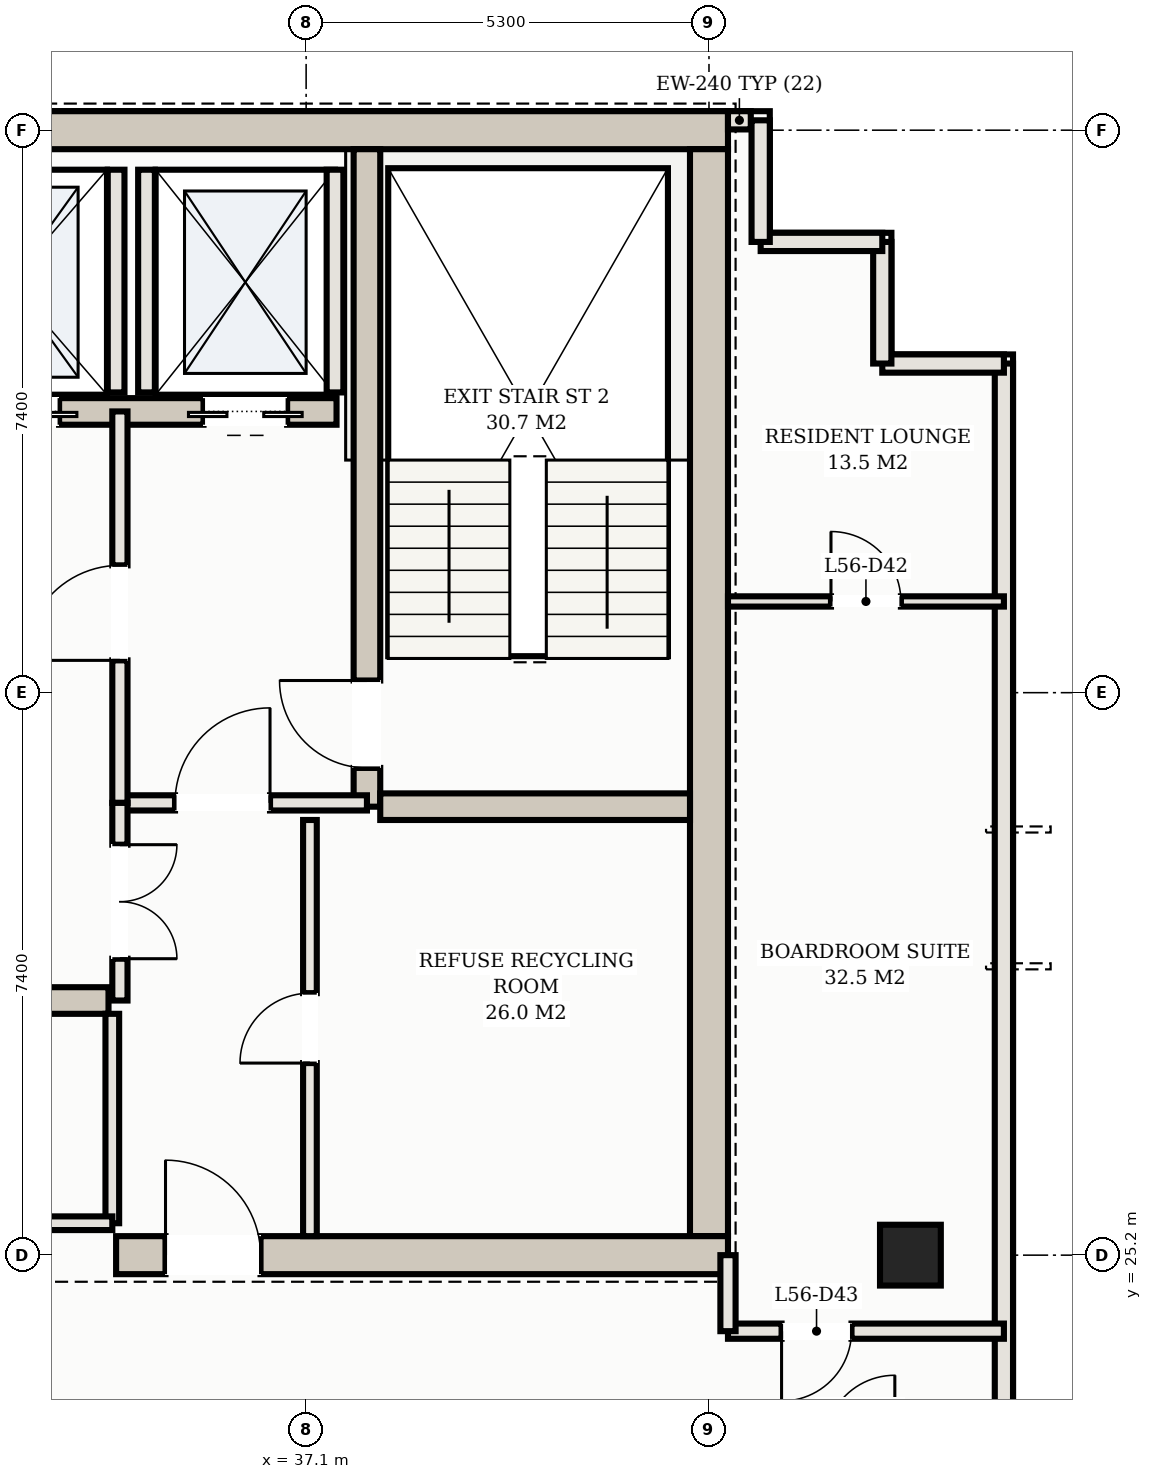
"""IFC4 building model, lengths in metres.
Left out: names, types, materials, properties, quantities, classifications, styles, units other than length and angle.
Written with IfcOpenShell. Run it as: python <this file> out.ifc"""

import sys

from ifc_helpers import new_model, si_unit, direction, frame, frame_2d, origin, origin_2d, place, context, subcontext, project, spatial, rectangle, hollow_rectangle, extrude, element, fill, save


model = new_model("IFC4")
c1 = context("Model", 3, precision=1e-05, world=origin(), true_north=direction((0.0, 1.0)))
c2 = subcontext(c1, "Body", "Model", "MODEL_VIEW")
j1 = project(units=[si_unit("LENGTHUNIT", "METRE"), si_unit("PLANEANGLEUNIT", "RADIAN")], contexts=[c1])
p1 = place(None, origin())
s1 = spatial("IfcSite", under=j1, at=p1, CompositionType="ELEMENT")
p2 = place(p1, origin())
s2 = spatial("IfcBuilding", under=s1, at=p2, CompositionType="ELEMENT")
p3 = place(p2, frame((0.0, 0.0, 206.6)))
s3 = spatial("IfcBuildingStorey", under=s2, at=p3, CompositionType="ELEMENT", Elevation=206.6)
p4 = place(p3, frame((10.35, 40.0, 0.0), z_axis=(0.0, 0.0, 1.0), x_axis=(1.0, 0.0, 0.0)))
e1 = element("IfcWall", 1, at=p4, inside=s3, PredefinedType="SHEAR", context=c2, shape_type="SweptSolid", body=[
    extrude(rectangle(XDim=32.3, YDim=0.5, at=frame_2d((16.15, 0.0))), origin(), (0.0, 0.0, 1.0), 3.11),
])
p5 = place(p3, frame((42.4, 25.45, 0.0), z_axis=(0.0, 0.0, 1.0), x_axis=(0.0, 1.0, 0.0)))
e2 = element("IfcWall", 2, at=p5, inside=s3, PredefinedType="SHEAR", context=c2, shape_type="SweptSolid", body=[
    extrude(rectangle(XDim=14.3, YDim=0.5, at=frame_2d((7.15, 0.0))), origin(), (0.0, 0.0, 1.0), 3.11),
])
p6 = place(p3, frame((34.6, 25.2, 0.0), z_axis=(0.0, 0.0, 1.0), x_axis=(1.0, 0.0, 0.0)))
e3 = element("IfcWall", 3, at=p6, inside=s3, PredefinedType="SHEAR", context=c2, shape_type="SweptSolid", body=[
    extrude(rectangle(XDim=8.05, YDim=0.5, at=frame_2d((4.025, 0.0))), origin(), (0.0, 0.0, 1.0), 3.11),
])
p7 = place(p6, frame((0.65, 0.0, 0.0)))
e4 = element("IfcOpeningElement", 4, at=p7, cuts=e3, PredefinedType="OPENING", context=c2, shape_type="SweptSolid", body=[
    extrude(rectangle(XDim=1.25, YDim=2.2, at=frame_2d((0.625, 1.1))), frame((0.0, 0.26, 0.0), z_axis=(0.0, -1.0, 0.0), x_axis=(1.0, 0.0, 0.0)), (0.0, 0.0, 1.0), 0.52),
])
p8 = place(p3, frame((37.9, 31.1, 0.0), z_axis=(0.0, 0.0, 1.0), x_axis=(0.0, 1.0, 0.0)))
e5 = element("IfcWall", 5, at=p8, inside=s3, PredefinedType="SHEAR", context=c2, shape_type="SweptSolid", body=[
    extrude(rectangle(XDim=8.65, YDim=0.35, at=frame_2d((4.325, 0.0))), origin(), (0.0, 0.0, 1.0), 3.11),
])
p9 = place(p8, frame((0.51, 0.0, 0.0)))
e6 = element("IfcOpeningElement", 6, at=p9, cuts=e5, PredefinedType="OPENING", context=c2, shape_type="SweptSolid", body=[
    extrude(rectangle(XDim=1.15, YDim=2.2, at=frame_2d((0.575, 1.1))), frame((0.0, 0.185, 0.0), z_axis=(0.0, -1.0, 0.0), x_axis=(1.0, 0.0, 0.0)), (0.0, 0.0, 1.0), 0.37),
])
p10 = place(p3, frame((38.075, 31.1, 0.0), z_axis=(0.0, 0.0, 1.0), x_axis=(1.0, 0.0, 0.0)))
e7 = element("IfcWall", 7, at=p10, inside=s3, PredefinedType="SHEAR", context=c2, shape_type="SweptSolid", body=[
    extrude(rectangle(XDim=4.075, YDim=0.35, at=frame_2d((2.038, 0.0))), origin(), (0.0, 0.0, 1.0), 3.11),
])
p11 = place(p3, frame((15.5, 36.3, 0.0), z_axis=(0.0, 0.0, 1.0), x_axis=(1.0, 0.0, 0.0)))
e8 = element("IfcWall", 8, at=p11, inside=s3, PredefinedType="SHEAR", context=c2, shape_type="SweptSolid", body=[
    extrude(rectangle(XDim=22.0, YDim=0.35, at=frame_2d((11.0, 0.0))), origin(), (0.0, 0.0, 1.0), 3.11),
])
p12 = place(p11, frame((0.65, 0.0, 0.0)))
e9 = element("IfcOpeningElement", 9, at=p12, cuts=e8, PredefinedType="OPENING", context=c2, shape_type="SweptSolid", body=[
    extrude(rectangle(XDim=1.1, YDim=2.15, at=frame_2d((0.55, 1.075))), frame((0.0, 0.185, 0.0), z_axis=(0.0, -1.0, 0.0), x_axis=(1.0, 0.0, 0.0)), (0.0, 0.0, 1.0), 0.37),
])
p13 = place(p11, frame((20.25, 0.0, 0.0)))
e10 = element("IfcOpeningElement", 10, at=p13, cuts=e8, PredefinedType="OPENING", context=c2, shape_type="SweptSolid", body=[
    extrude(rectangle(XDim=1.1, YDim=2.15, at=frame_2d((0.55, 1.075))), frame((0.0, 0.185, 0.0), z_axis=(0.0, -1.0, 0.0), x_axis=(1.0, 0.0, 0.0)), (0.0, 0.0, 1.0), 0.37),
])
p14 = place(p11, frame((17.05, 0.0, 0.0)))
e11 = element("IfcOpeningElement", 11, at=p14, cuts=e8, PredefinedType="OPENING", context=c2, shape_type="SweptSolid", body=[
    extrude(rectangle(XDim=1.3, YDim=2.2, at=frame_2d((0.65, 1.1))), frame((0.0, 0.185, 0.0), z_axis=(0.0, -1.0, 0.0), x_axis=(1.0, 0.0, 0.0)), (0.0, 0.0, 1.0), 0.37),
])
p15 = place(p11, frame((3.95, 0.0, 0.0)))
e12 = element("IfcOpeningElement", 12, at=p15, cuts=e8, PredefinedType="OPENING", context=c2, shape_type="SweptSolid", body=[
    extrude(rectangle(XDim=1.1, YDim=2.15, at=frame_2d((0.55, 1.075))), frame((0.0, 0.185, 0.0), z_axis=(0.0, -1.0, 0.0), x_axis=(1.0, 0.0, 0.0)), (0.0, 0.0, 1.0), 0.37),
])
p16 = place(p11, frame((6.55, 0.0, 0.0)))
e13 = element("IfcOpeningElement", 13, at=p16, cuts=e8, PredefinedType="OPENING", context=c2, shape_type="SweptSolid", body=[
    extrude(rectangle(XDim=1.1, YDim=2.15, at=frame_2d((0.55, 1.075))), frame((0.0, 0.185, 0.0), z_axis=(0.0, -1.0, 0.0), x_axis=(1.0, 0.0, 0.0)), (0.0, 0.0, 1.0), 0.37),
])
p17 = place(p11, frame((9.15, 0.0, 0.0)))
e14 = element("IfcOpeningElement", 14, at=p17, cuts=e8, PredefinedType="OPENING", context=c2, shape_type="SweptSolid", body=[
    extrude(rectangle(XDim=1.1, YDim=2.15, at=frame_2d((0.55, 1.075))), frame((0.0, 0.185, 0.0), z_axis=(0.0, -1.0, 0.0), x_axis=(1.0, 0.0, 0.0)), (0.0, 0.0, 1.0), 0.37),
])
p18 = place(p3, frame((18.5, 28.55, 0.0), z_axis=(0.0, 0.0, 1.0), x_axis=(1.0, 0.0, 0.0)))
e15 = element("IfcWall", 15, at=p18, inside=s3, PredefinedType="SHEAR", context=c2, shape_type="SweptSolid", body=[
    extrude(rectangle(XDim=16.0, YDim=0.35, at=frame_2d((8.0, 0.0))), origin(), (0.0, 0.0, 1.0), 3.11),
])
p19 = place(p3, frame((45.05, 25.2, 0.0), z_axis=(0.0, 0.0, 1.0), x_axis=(1.0, 0.0, 0.0)))
e16 = element("IfcColumn", 16, at=p19, inside=s3, PredefinedType="COLUMN", context=c2, shape_type="SweptSolid", body=[
    extrude(hollow_rectangle(XDim=0.8, YDim=0.8, WallThickness=0.028, at=origin_2d()), origin(), (0.0, 0.0, 1.0), 3.3),
])
for number, where, z_axis, x_axis in (
    (17, (35.0, 36.55, 0.0), (0.0, 0.0, 1.0), (0.0, 1.0, 0.0)),
    (18, (37.48, 36.55, 0.0), (0.0, 0.0, 1.0), (0.0, 1.0, 0.0)),
    (19, (34.6, 36.55, 0.0), (0.0, 0.0, 1.0), (0.0, 1.0, 0.0)),
):
    element("IfcWall", number, at=place(p3, frame(where, z_axis=z_axis, x_axis=x_axis)), inside=s3, PredefinedType="SOLIDWALL", context=c2, shape_type="SweptSolid", body=[
        extrude(rectangle(XDim=2.93, YDim=0.22, at=frame_2d((1.465, 0.0))), origin(), (0.0, 0.0, 1.0), 3.11),
    ])
p20 = place(p3, frame((46.28, 10.52, 0.0), z_axis=(0.0, 0.0, 1.0), x_axis=(0.0, 1.0, 0.0)))
e20 = element("IfcWall", 20, at=p20, inside=s3, PredefinedType="SOLIDWALL", context=c2, shape_type="SweptSolid", body=[
    extrude(rectangle(XDim=26.41, YDim=0.24, at=frame_2d((13.205, 0.0))), origin(), (0.0, 0.0, 1.0), 3.11),
])
p21 = place(p20, frame((6.48, 0.0, 0.0)))
e21 = element("IfcOpeningElement", 21, at=p21, cuts=e20, PredefinedType="OPENING", context=c2, shape_type="SweptSolid", body=[
    extrude(rectangle(XDim=1.8, YDim=2.2, at=frame_2d((0.9, 1.1))), frame((0.0, 0.13, 0.0), z_axis=(0.0, -1.0, 0.0), x_axis=(1.0, 0.0, 0.0)), (0.0, 0.0, 1.0), 0.26),
])
for number, where, z_axis, x_axis in (
    (22, (46.28, 36.93, 0.0), (0.0, 0.0, 1.0), (-1.0, 0.0, 0.0)),
    (23, (44.68, 36.93, 0.0), (0.0, 0.0, 1.0), (0.0, 1.0, 0.0)),
):
    element("IfcWall", number, at=place(p3, frame(where, z_axis=z_axis, x_axis=x_axis)), inside=s3, PredefinedType="SOLIDWALL", context=c2, shape_type="SweptSolid", body=[
        extrude(rectangle(XDim=1.6, YDim=0.24, at=frame_2d((0.8, 0.0))), origin(), (0.0, 0.0, 1.0), 3.11),
    ])
for number, where, z_axis, x_axis in (
    (24, (44.68, 38.53, 0.0), (0.0, 0.0, 1.0), (-1.0, 0.0, 0.0)),
    (25, (43.08, 38.53, 0.0), (0.0, 0.0, 1.0), (0.0, 1.0, 0.0)),
):
    element("IfcWall", number, at=place(p3, frame(where, z_axis=z_axis, x_axis=x_axis)), inside=s3, PredefinedType="SOLIDWALL", context=c2, shape_type="SweptSolid", body=[
        extrude(rectangle(XDim=1.6, YDim=0.24, at=frame_2d((0.8, 0.0))), origin(), (0.0, 0.0, 1.0), 3.11),
    ])
p22 = place(p3, frame((42.95, 40.13, 0.0), z_axis=(0.0, 0.0, 1.0), x_axis=(-1.0, 0.0, 0.0)))
e26 = element("IfcWall", 26, at=p22, inside=s3, PredefinedType="SOLIDWALL", context=c2, shape_type="SweptSolid", body=[
    extrude(rectangle(XDim=0.3, YDim=0.24, at=frame_2d((0.15, 0.0))), origin(), (0.0, 0.0, 1.0), 3.11),
])
p23 = place(p3, frame((34.65, 31.15, 0.0), z_axis=(0.0, 0.0, 1.0), x_axis=(1.0, 0.0, 0.0)))
e27 = element("IfcWall", 27, at=p23, inside=s3, PredefinedType="PARTITIONING", context=c2, shape_type="SweptSolid", body=[
    extrude(rectangle(XDim=3.25, YDim=0.2, at=frame_2d((1.625, 0.0))), origin(), (0.0, 0.0, 1.0), 2.43),
])
p24 = place(p23, frame((0.725, 0.0, 0.0)))
e28 = element("IfcOpeningElement", 28, at=p24, cuts=e27, PredefinedType="OPENING", context=c2, shape_type="SweptSolid", body=[
    extrude(rectangle(XDim=1.25, YDim=2.2, at=frame_2d((0.625, 1.1))), frame((0.0, 0.11, 0.0), z_axis=(0.0, -1.0, 0.0), x_axis=(1.0, 0.0, 0.0)), (0.0, 0.0, 1.0), 0.22),
])
p25 = place(p3, frame((34.65, 31.15, 0.0), z_axis=(0.0, 0.0, 1.0), x_axis=(0.0, 1.0, 0.0)))
e29 = element("IfcWall", 29, at=p25, inside=s3, PredefinedType="PARTITIONING", context=c2, shape_type="SweptSolid", body=[
    extrude(rectangle(XDim=5.15, YDim=0.2, at=frame_2d((2.575, 0.0))), origin(), (0.0, 0.0, 1.0), 2.43),
])
p26 = place(p25, frame((1.875, 0.0, 0.0)))
e30 = element("IfcOpeningElement", 30, at=p26, cuts=e29, PredefinedType="OPENING", context=c2, shape_type="SweptSolid", body=[
    extrude(rectangle(XDim=1.25, YDim=2.2, at=frame_2d((0.625, 1.1))), frame((0.0, 0.11, 0.0), z_axis=(0.0, -1.0, 0.0), x_axis=(1.0, 0.0, 0.0)), (0.0, 0.0, 1.0), 0.22),
])
p27 = place(p3, frame((37.15, 25.45, 0.0), z_axis=(0.0, 0.0, 1.0), x_axis=(0.0, 1.0, 0.0)))
e31 = element("IfcWall", 31, at=p27, inside=s3, PredefinedType="PARTITIONING", context=c2, shape_type="SweptSolid", body=[
    extrude(rectangle(XDim=5.475, YDim=0.18, at=frame_2d((2.738, 0.0))), origin(), (0.0, 0.0, 1.0), 2.43),
])
p28 = place(p27, frame((2.277, 0.0, 0.0)))
e32 = element("IfcOpeningElement", 32, at=p28, cuts=e31, PredefinedType="OPENING", context=c2, shape_type="SweptSolid", body=[
    extrude(rectangle(XDim=0.92, YDim=2.15, at=frame_2d((0.46, 1.075))), frame((0.0, 0.1, 0.0), z_axis=(0.0, -1.0, 0.0), x_axis=(1.0, 0.0, 0.0)), (0.0, 0.0, 1.0), 0.2),
])
p29 = place(p3, frame((34.65, 28.55, 0.0), z_axis=(0.0, 0.0, 1.0), x_axis=(0.0, 1.0, 0.0)))
e33 = element("IfcWall", 33, at=p29, inside=s3, PredefinedType="PARTITIONING", context=c2, shape_type="SweptSolid", body=[
    extrude(rectangle(XDim=2.6, YDim=0.2, at=frame_2d((1.3, 0.0))), origin(), (0.0, 0.0, 1.0), 2.43),
])
p30 = place(p29, frame((0.55, 0.0, 0.0)))
e34 = element("IfcOpeningElement", 34, at=p30, cuts=e33, PredefinedType="OPENING", context=c2, shape_type="SweptSolid", body=[
    extrude(rectangle(XDim=1.5, YDim=2.25, at=frame_2d((0.75, 1.125))), frame((0.0, 0.11, 0.0), z_axis=(0.0, -1.0, 0.0), x_axis=(1.0, 0.0, 0.0)), (0.0, 0.0, 1.0), 0.22),
])
p31 = place(p3, frame((34.55, 25.62, 0.0), z_axis=(0.0, 0.0, 1.0), x_axis=(0.0, 1.0, 0.0)))
e35 = element("IfcWall", 35, at=p31, inside=s3, PredefinedType="PARTITIONING", context=c2, shape_type="SweptSolid", body=[
    extrude(rectangle(XDim=2.755, YDim=0.18, at=frame_2d((1.377, 0.0))), origin(), (0.0, 0.0, 1.0), 2.43),
])
p32 = place(p3, frame((26.65, 25.62, 0.0), z_axis=(0.0, 0.0, 1.0), x_axis=(1.0, 0.0, 0.0)))
e36 = element("IfcWall", 36, at=p32, inside=s3, PredefinedType="PARTITIONING", context=c2, shape_type="SweptSolid", body=[
    extrude(rectangle(XDim=7.9, YDim=0.18, at=frame_2d((3.95, 0.0))), origin(), (0.0, 0.0, 1.0), 2.43),
])
p33 = place(p32, frame((3.34, 0.0, 0.0)))
e37 = element("IfcOpeningElement", 37, at=p33, cuts=e36, PredefinedType="OPENING", context=c2, shape_type="SweptSolid", body=[
    extrude(rectangle(XDim=0.92, YDim=2.15, at=frame_2d((0.46, 1.075))), frame((0.0, 0.1, 0.0), z_axis=(0.0, -1.0, 0.0), x_axis=(1.0, 0.0, 0.0)), (0.0, 0.0, 1.0), 0.2),
])
p34 = place(p3, frame((42.65, 24.2, 0.0), z_axis=(0.0, 0.0, 1.0), x_axis=(1.0, 0.0, 0.0)))
e38 = element("IfcWall", 38, at=p34, inside=s3, PredefinedType="PARTITIONING", context=c2, shape_type="SweptSolid", body=[
    extrude(rectangle(XDim=3.63, YDim=0.2, at=frame_2d((1.815, 0.0))), origin(), (0.0, 0.0, 1.0), 2.43),
])
p35 = place(p34, frame((0.705, 0.0, 0.0)))
e39 = element("IfcOpeningElement", 39, at=p35, cuts=e38, PredefinedType="OPENING", context=c2, shape_type="SweptSolid", body=[
    extrude(rectangle(XDim=0.92, YDim=2.15, at=frame_2d((0.46, 1.075))), frame((0.0, 0.11, 0.0), z_axis=(0.0, -1.0, 0.0), x_axis=(1.0, 0.0, 0.0)), (0.0, 0.0, 1.0), 0.22),
])
p36 = place(p3, frame((42.65, 24.2, 0.0), z_axis=(0.0, 0.0, 1.0), x_axis=(0.0, 1.0, 0.0)))
e40 = element("IfcWall", 40, at=p36, inside=s3, PredefinedType="PARTITIONING", context=c2, shape_type="SweptSolid", body=[
    extrude(rectangle(XDim=1.0, YDim=0.2, at=frame_2d((0.5, 0.0))), origin(), (0.0, 0.0, 1.0), 2.43),
])
p37 = place(p3, frame((42.65, 33.8, 0.0), z_axis=(0.0, 0.0, 1.0), x_axis=(1.0, 0.0, 0.0)))
e41 = element("IfcWall", 41, at=p37, inside=s3, PredefinedType="PARTITIONING", context=c2, shape_type="SweptSolid", body=[
    extrude(rectangle(XDim=3.63, YDim=0.135, at=frame_2d((1.815, 0.0))), origin(), (0.0, 0.0, 1.0), 2.43),
])
p38 = place(p37, frame((1.355, 0.0, 0.0)))
e42 = element("IfcOpeningElement", 42, at=p38, cuts=e41, PredefinedType="OPENING", context=c2, shape_type="SweptSolid", body=[
    extrude(rectangle(XDim=0.92, YDim=2.15, at=frame_2d((0.46, 1.075))), frame((0.0, 0.078, 0.0), z_axis=(0.0, -1.0, 0.0), x_axis=(1.0, 0.0, 0.0)), (0.0, 0.0, 1.0), 0.155),
])
p39 = place(p13, frame((1.1, 0.0, 0.0), z_axis=(0.0, 0.0, 1.0), x_axis=(-1.0, 0.0, 0.0)))
e43 = element("IfcDoor", 43, at=p39, inside=s3, OperationType="DOUBLE_DOOR_SLIDING", PredefinedType="DOOR", context=c2, shape_type="SweptSolid", body=[
    extrude(rectangle(XDim=1.1, YDim=2.15, at=frame_2d((0.55, 1.075))), frame((0.0, 0.025, 0.0), z_axis=(0.0, -1.0, 0.0), x_axis=(1.0, 0.0, 0.0)), (0.0, 0.0, 1.0), 0.05),
])
fill(e10, e43)
p40 = place(p14, frame((1.3, 0.0, 0.0), z_axis=(0.0, 0.0, 1.0), x_axis=(-1.0, 0.0, 0.0)))
e44 = element("IfcDoor", 44, at=p40, inside=s3, OperationType="DOUBLE_DOOR_SLIDING", PredefinedType="DOOR", context=c2, shape_type="SweptSolid", body=[
    extrude(rectangle(XDim=1.3, YDim=2.2, at=frame_2d((0.65, 1.1))), frame((0.0, 0.025, 0.0), z_axis=(0.0, -1.0, 0.0), x_axis=(1.0, 0.0, 0.0)), (0.0, 0.0, 1.0), 0.05),
])
fill(e11, e44)
p41 = place(p7, origin())
e45 = element("IfcDoor", 45, at=p41, inside=s3, OperationType="SINGLE_SWING_LEFT", PredefinedType="DOOR", context=c2, shape_type="SweptSolid", body=[
    extrude(rectangle(XDim=1.25, YDim=2.2, at=frame_2d((0.625, 1.1))), frame((0.0, 0.025, 0.0), z_axis=(0.0, -1.0, 0.0), x_axis=(1.0, 0.0, 0.0)), (0.0, 0.0, 1.0), 0.05),
])
fill(e4, e45)
p42 = place(p24, origin())
e46 = element("IfcDoor", 46, at=p42, inside=s3, OperationType="SINGLE_SWING_RIGHT", PredefinedType="DOOR", context=c2, shape_type="SweptSolid", body=[
    extrude(rectangle(XDim=1.25, YDim=2.2, at=frame_2d((0.625, 1.1))), frame((0.0, 0.025, 0.0), z_axis=(0.0, -1.0, 0.0), x_axis=(1.0, 0.0, 0.0)), (0.0, 0.0, 1.0), 0.05),
])
fill(e28, e46)
p43 = place(p26, origin())
e47 = element("IfcDoor", 47, at=p43, inside=s3, OperationType="SINGLE_SWING_LEFT", PredefinedType="DOOR", context=c2, shape_type="SweptSolid", body=[
    extrude(rectangle(XDim=1.25, YDim=2.2, at=frame_2d((0.625, 1.1))), frame((0.0, 0.025, 0.0), z_axis=(0.0, -1.0, 0.0), x_axis=(1.0, 0.0, 0.0)), (0.0, 0.0, 1.0), 0.05),
])
fill(e30, e47)
p44 = place(p9, origin())
e48 = element("IfcDoor", 48, at=p44, inside=s3, OperationType="SINGLE_SWING_RIGHT", PredefinedType="DOOR", context=c2, shape_type="SweptSolid", body=[
    extrude(rectangle(XDim=1.15, YDim=2.2, at=frame_2d((0.575, 1.1))), frame((0.0, 0.025, 0.0), z_axis=(0.0, -1.0, 0.0), x_axis=(1.0, 0.0, 0.0)), (0.0, 0.0, 1.0), 0.05),
])
fill(e6, e48)
p45 = place(p28, origin())
e49 = element("IfcDoor", 49, at=p45, inside=s3, OperationType="SINGLE_SWING_LEFT", PredefinedType="DOOR", context=c2, shape_type="SweptSolid", body=[
    extrude(rectangle(XDim=0.92, YDim=2.15, at=frame_2d((0.46, 1.075))), frame((0.0, 0.025, 0.0), z_axis=(0.0, -1.0, 0.0), x_axis=(1.0, 0.0, 0.0)), (0.0, 0.0, 1.0), 0.05),
])
fill(e32, e49)
p46 = place(p30, frame((1.5, 0.0, 0.0), z_axis=(0.0, 0.0, 1.0), x_axis=(-1.0, 0.0, 0.0)))
e50 = element("IfcDoor", 50, at=p46, inside=s3, OperationType="DOUBLE_DOOR_SINGLE_SWING", PredefinedType="DOOR", context=c2, shape_type="SweptSolid", body=[
    extrude(rectangle(XDim=1.5, YDim=2.25, at=frame_2d((0.75, 1.125))), frame((0.0, 0.025, 0.0), z_axis=(0.0, -1.0, 0.0), x_axis=(1.0, 0.0, 0.0)), (0.0, 0.0, 1.0), 0.05),
])
fill(e34, e50)
p47 = place(p38, origin())
e51 = element("IfcDoor", 51, at=p47, inside=s3, OperationType="SINGLE_SWING_LEFT", PredefinedType="DOOR", context=c2, shape_type="SweptSolid", body=[
    extrude(rectangle(XDim=0.92, YDim=2.15, at=frame_2d((0.46, 1.075))), frame((0.0, 0.025, 0.0), z_axis=(0.0, -1.0, 0.0), x_axis=(1.0, 0.0, 0.0)), (0.0, 0.0, 1.0), 0.05),
])
fill(e42, e51)
p48 = place(p35, frame((0.92, 0.0, 0.0), z_axis=(0.0, 0.0, 1.0), x_axis=(-1.0, 0.0, 0.0)))
e52 = element("IfcDoor", 52, at=p48, inside=s3, OperationType="SINGLE_SWING_RIGHT", PredefinedType="DOOR", context=c2, shape_type="SweptSolid", body=[
    extrude(rectangle(XDim=0.92, YDim=2.15, at=frame_2d((0.46, 1.075))), frame((0.0, 0.025, 0.0), z_axis=(0.0, -1.0, 0.0), x_axis=(1.0, 0.0, 0.0)), (0.0, 0.0, 1.0), 0.05),
])
fill(e39, e52)
save(model, sys.argv[1])
